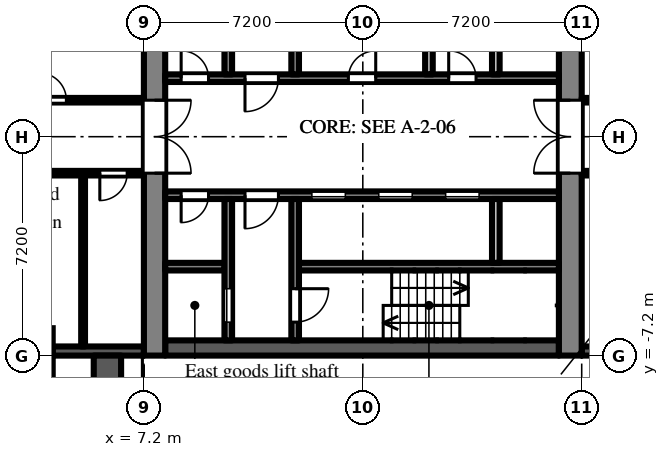
"""IFC4 building model, lengths in metres.
Left out: names, types, materials, properties, quantities, classifications, styles, units other than length and angle.
Written with IfcOpenShell. Run it as: python <this file> out.ifc"""

import sys

from ifc_helpers import new_model, si_unit, direction, frame, frame_2d, origin, place, context, subcontext, project, spatial, rectangle, extrude, element, fill, save


model = new_model("IFC4")
c1 = context("Model", 3, precision=1e-05, world=origin(), true_north=direction((0.0, 1.0)))
c2 = subcontext(c1, "Body", "Model", "MODEL_VIEW")
j1 = project(units=[si_unit("LENGTHUNIT", "METRE"), si_unit("PLANEANGLEUNIT", "RADIAN")], contexts=[c1])
p1 = place(None, origin())
s1 = spatial("IfcSite", under=j1, at=p1, CompositionType="ELEMENT")
p2 = place(p1, origin())
s2 = spatial("IfcBuilding", under=s1, at=p2, CompositionType="ELEMENT")
p3 = place(p2, frame((0.0, 0.0, 29.7)))
s3 = spatial("IfcBuildingStorey", under=s2, at=p3, CompositionType="ELEMENT", Elevation=29.7)
p4 = place(p3, frame((21.6, -7.05, 0.0), z_axis=(0.0, 0.0, 1.0), x_axis=(1.0, 0.0, 0.0)))
e1 = element("IfcWall", 1, at=p4, inside=s3, PredefinedType="SOLIDWALL", context=c2, shape_type="SweptSolid", body=[
    extrude(rectangle(XDim=2.7, YDim=0.3, at=frame_2d((1.35, 0.0))), origin(), (0.0, 0.0, 1.0), 2.1),
])
p5 = place(p4, frame((0.75, 0.0, 0.2)))
e2 = element("IfcOpeningElement", 2, at=p5, cuts=e1, PredefinedType="OPENING", context=c2, shape_type="SweptSolid", body=[
    extrude(rectangle(XDim=1.2, YDim=1.85, at=frame_2d((0.6, 0.925))), frame((0.0, 0.16, 0.0), z_axis=(0.0, -1.0, 0.0), x_axis=(1.0, 0.0, 0.0)), (0.0, 0.0, 1.0), 0.32),
])
p6 = place(p3, frame((4.05, -14.4, 0.0), z_axis=(0.0, 0.0, 1.0), x_axis=(0.0, 1.0, 0.0)))
e3 = element("IfcWall", 3, at=p6, inside=s3, PredefinedType="SOLIDWALL", context=c2, shape_type="SweptSolid", body=[
    extrude(rectangle(XDim=7.2, YDim=0.3, at=frame_2d((3.6, 0.0))), origin(), (0.0, 0.0, 1.0), 2.1),
])
p7 = place(p6, frame((3.0, 0.0, 0.0)))
e4 = element("IfcOpeningElement", 4, at=p7, cuts=e3, PredefinedType="OPENING", context=c2, shape_type="SweptSolid", body=[
    extrude(rectangle(XDim=1.2, YDim=2.05, at=frame_2d((0.6, 1.025))), frame((0.0, 0.16, 0.0), z_axis=(0.0, -1.0, 0.0), x_axis=(1.0, 0.0, 0.0)), (0.0, 0.0, 1.0), 0.32),
])
p8 = place(p6, frame((0.9, 0.0, 0.2)))
e5 = element("IfcOpeningElement", 5, at=p8, cuts=e3, PredefinedType="OPENING", context=c2, shape_type="SweptSolid", body=[
    extrude(rectangle(XDim=1.8, YDim=1.85, at=frame_2d((0.9, 0.925))), frame((0.0, 0.16, 0.0), z_axis=(0.0, -1.0, 0.0), x_axis=(1.0, 0.0, 0.0)), (0.0, 0.0, 1.0), 0.32),
])
p9 = place(p6, frame((4.5, 0.0, 0.2)))
e6 = element("IfcOpeningElement", 6, at=p9, cuts=e3, PredefinedType="OPENING", context=c2, shape_type="SweptSolid", body=[
    extrude(rectangle(XDim=1.8, YDim=1.85, at=frame_2d((0.9, 0.925))), frame((0.0, 0.16, 0.0), z_axis=(0.0, -1.0, 0.0), x_axis=(1.0, 0.0, 0.0)), (0.0, 0.0, 1.0), 0.32),
])
p10 = place(p3, frame((4.2, -7.05, 0.0), z_axis=(0.0, 0.0, 1.0), x_axis=(1.0, 0.0, 0.0)))
e7 = element("IfcWall", 7, at=p10, inside=s3, PredefinedType="SOLIDWALL", context=c2, shape_type="SweptSolid", body=[
    extrude(rectangle(XDim=3.0, YDim=0.3, at=frame_2d((1.5, 0.0))), origin(), (0.0, 0.0, 1.0), 2.1),
])
p11 = place(p3, frame((6.0, -14.4, 0.0), z_axis=(0.0, 0.0, 1.0), x_axis=(0.0, 1.0, 0.0)))
e8 = element("IfcWall", 8, at=p11, inside=s3, PredefinedType="PARAPET", context=c2, shape_type="SweptSolid", body=[
    extrude(rectangle(XDim=7.2, YDim=0.9, at=frame_2d((3.6, 0.0))), origin(), (0.0, 0.0, 1.0), 0.8),
])
p12 = place(p3, frame((7.55, -7.2, 0.0), z_axis=(0.0, 0.0, 1.0), x_axis=(0.0, 1.0, 0.0)))
e9 = element("IfcWall", 9, at=p12, inside=s3, PredefinedType="SHEAR", context=c2, shape_type="SweptSolid", body=[
    extrude(rectangle(XDim=14.4, YDim=0.7, at=frame_2d((7.2, 0.0))), origin(), (0.0, 0.0, 1.0), 2.575),
])
p13 = place(p12, frame((6.0, 0.0, 0.0)))
e10 = element("IfcOpeningElement", 10, at=p13, cuts=e9, PredefinedType="OPENING", context=c2, shape_type="SweptSolid", body=[
    extrude(rectangle(XDim=2.4, YDim=2.2, at=frame_2d((1.2, 1.1))), frame((0.0, 0.36, 0.0), z_axis=(0.0, -1.0, 0.0), x_axis=(1.0, 0.0, 0.0)), (0.0, 0.0, 1.0), 0.72),
])
p14 = place(p3, frame((21.225, -7.2, 0.0), z_axis=(0.0, 0.0, 1.0), x_axis=(0.0, 1.0, 0.0)))
e11 = element("IfcWall", 11, at=p14, inside=s3, PredefinedType="SHEAR", context=c2, shape_type="SweptSolid", body=[
    extrude(rectangle(XDim=14.4, YDim=0.75, at=frame_2d((7.2, 0.0))), origin(), (0.0, 0.0, 1.0), 2.575),
])
p15 = place(p14, frame((6.0, 0.0, 0.0)))
e12 = element("IfcOpeningElement", 12, at=p15, cuts=e11, PredefinedType="OPENING", context=c2, shape_type="SweptSolid", body=[
    extrude(rectangle(XDim=2.4, YDim=2.2, at=frame_2d((1.2, 1.1))), frame((0.0, 0.385, 0.0), z_axis=(0.0, -1.0, 0.0), x_axis=(1.0, 0.0, 0.0)), (0.0, 0.0, 1.0), 0.77),
])
p16 = place(p3, frame((7.9, 1.925, 0.0), z_axis=(0.0, 0.0, 1.0), x_axis=(1.0, 0.0, 0.0)))
e13 = element("IfcWall", 13, at=p16, inside=s3, PredefinedType="SHEAR", context=c2, shape_type="SweptSolid", body=[
    extrude(rectangle(XDim=12.95, YDim=0.25, at=frame_2d((6.475, 0.0))), origin(), (0.0, 0.0, 1.0), 2.575),
])
p17 = place(p16, frame((0.525, 0.0, 0.0)))
e14 = element("IfcOpeningElement", 14, at=p17, cuts=e13, PredefinedType="OPENING", context=c2, shape_type="SweptSolid", body=[
    extrude(rectangle(XDim=0.9, YDim=2.1, at=frame_2d((0.45, 1.05))), frame((0.0, 0.135, 0.0), z_axis=(0.0, -1.0, 0.0), x_axis=(1.0, 0.0, 0.0)), (0.0, 0.0, 1.0), 0.27),
])
p18 = place(p16, frame((2.625, 0.0, 0.0)))
e15 = element("IfcOpeningElement", 15, at=p18, cuts=e13, PredefinedType="OPENING", context=c2, shape_type="SweptSolid", body=[
    extrude(rectangle(XDim=1.1, YDim=2.1, at=frame_2d((0.55, 1.05))), frame((0.0, 0.135, 0.0), z_axis=(0.0, -1.0, 0.0), x_axis=(1.0, 0.0, 0.0)), (0.0, 0.0, 1.0), 0.27),
])
p19 = place(p16, frame((6.025, 0.0, 0.0)))
e16 = element("IfcOpeningElement", 16, at=p19, cuts=e13, PredefinedType="OPENING", context=c2, shape_type="SweptSolid", body=[
    extrude(rectangle(XDim=0.9, YDim=2.1, at=frame_2d((0.45, 1.05))), frame((0.0, 0.135, 0.0), z_axis=(0.0, -1.0, 0.0), x_axis=(1.0, 0.0, 0.0)), (0.0, 0.0, 1.0), 0.27),
])
p20 = place(p16, frame((9.325, 0.0, 0.0)))
e17 = element("IfcOpeningElement", 17, at=p20, cuts=e13, PredefinedType="OPENING", context=c2, shape_type="SweptSolid", body=[
    extrude(rectangle(XDim=0.9, YDim=2.1, at=frame_2d((0.45, 1.05))), frame((0.0, 0.135, 0.0), z_axis=(0.0, -1.0, 0.0), x_axis=(1.0, 0.0, 0.0)), (0.0, 0.0, 1.0), 0.27),
])
p21 = place(p3, frame((9.975, 2.05, 0.0), z_axis=(0.0, 0.0, 1.0), x_axis=(0.0, 1.0, 0.0)))
e18 = element("IfcWall", 18, at=p21, inside=s3, PredefinedType="SHEAR", context=c2, shape_type="SweptSolid", body=[
    extrude(rectangle(XDim=4.65, YDim=0.25, at=frame_2d((2.325, 0.0))), origin(), (0.0, 0.0, 1.0), 2.575),
])
p22 = place(p21, frame((2.95, 0.0, 0.0)))
e19 = element("IfcOpeningElement", 19, at=p22, cuts=e18, PredefinedType="OPENING", context=c2, shape_type="SweptSolid", body=[
    extrude(rectangle(XDim=1.1, YDim=2.1, at=frame_2d((0.55, 1.05))), frame((0.0, 0.135, 0.0), z_axis=(0.0, -1.0, 0.0), x_axis=(1.0, 0.0, 0.0)), (0.0, 0.0, 1.0), 0.27),
])
p23 = place(p3, frame((12.175, 2.05, 0.0), z_axis=(0.0, 0.0, 1.0), x_axis=(0.0, 1.0, 0.0)))
e20 = element("IfcWall", 20, at=p23, inside=s3, PredefinedType="SHEAR", context=c2, shape_type="SweptSolid", body=[
    extrude(rectangle(XDim=4.65, YDim=0.25, at=frame_2d((2.325, 0.0))), origin(), (0.0, 0.0, 1.0), 2.575),
])
p24 = place(p23, frame((2.95, 0.0, 0.0)))
e21 = element("IfcOpeningElement", 21, at=p24, cuts=e20, PredefinedType="OPENING", context=c2, shape_type="SweptSolid", body=[
    extrude(rectangle(XDim=1.1, YDim=2.1, at=frame_2d((0.55, 1.05))), frame((0.0, 0.135, 0.0), z_axis=(0.0, -1.0, 0.0), x_axis=(1.0, 0.0, 0.0)), (0.0, 0.0, 1.0), 0.27),
])
for number, where, z_axis, x_axis in (
    (22, (16.575, 2.05, 0.0), (0.0, 0.0, 1.0), (0.0, 1.0, 0.0)),
    (23, (18.775, 2.05, 0.0), (0.0, 0.0, 1.0), (0.0, 1.0, 0.0)),
):
    element("IfcWall", number, at=place(p3, frame(where, z_axis=z_axis, x_axis=x_axis)), inside=s3, PredefinedType="PARTITIONING", context=c2, shape_type="SweptSolid", body=[
        extrude(rectangle(XDim=2.1, YDim=0.25, at=frame_2d((1.05, 0.0))), origin(), (0.0, 0.0, 1.0), 2.575),
    ])
p25 = place(p3, frame((7.9, -6.95, 0.0), z_axis=(0.0, 0.0, 1.0), x_axis=(1.0, 0.0, 0.0)))
e24 = element("IfcWall", 24, at=p25, inside=s3, PredefinedType="SHEAR", context=c2, shape_type="SweptSolid", body=[
    extrude(rectangle(XDim=12.95, YDim=0.5, at=frame_2d((6.475, 0.0))), origin(), (0.0, 0.0, 1.0), 2.575),
])
p26 = place(p3, frame((7.9, -1.925, 0.0), z_axis=(0.0, 0.0, 1.0), x_axis=(1.0, 0.0, 0.0)))
e25 = element("IfcWall", 25, at=p26, inside=s3, PredefinedType="SHEAR", context=c2, shape_type="SweptSolid", body=[
    extrude(rectangle(XDim=12.95, YDim=0.25, at=frame_2d((6.475, 0.0))), origin(), (0.0, 0.0, 1.0), 2.575),
])
p27 = place(p26, frame((4.825, 0.0, 0.0)))
e26 = element("IfcOpeningElement", 26, at=p27, cuts=e25, PredefinedType="OPENING", context=c2, shape_type="SweptSolid", body=[
    extrude(rectangle(XDim=1.1, YDim=2.1, at=frame_2d((0.55, 1.05))), frame((0.0, 0.135, 0.0), z_axis=(0.0, -1.0, 0.0), x_axis=(1.0, 0.0, 0.0)), (0.0, 0.0, 1.0), 0.27),
])
p28 = place(p26, frame((7.025, 0.0, 0.0)))
e27 = element("IfcOpeningElement", 27, at=p28, cuts=e25, PredefinedType="OPENING", context=c2, shape_type="SweptSolid", body=[
    extrude(rectangle(XDim=1.1, YDim=2.1, at=frame_2d((0.55, 1.05))), frame((0.0, 0.135, 0.0), z_axis=(0.0, -1.0, 0.0), x_axis=(1.0, 0.0, 0.0)), (0.0, 0.0, 1.0), 0.27),
])
p29 = place(p26, frame((9.225, 0.0, 0.0)))
e28 = element("IfcOpeningElement", 28, at=p29, cuts=e25, PredefinedType="OPENING", context=c2, shape_type="SweptSolid", body=[
    extrude(rectangle(XDim=1.1, YDim=2.1, at=frame_2d((0.55, 1.05))), frame((0.0, 0.135, 0.0), z_axis=(0.0, -1.0, 0.0), x_axis=(1.0, 0.0, 0.0)), (0.0, 0.0, 1.0), 0.27),
])
p30 = place(p26, frame((0.525, 0.0, 0.0)))
e29 = element("IfcOpeningElement", 29, at=p30, cuts=e25, PredefinedType="OPENING", context=c2, shape_type="SweptSolid", body=[
    extrude(rectangle(XDim=0.9, YDim=2.1, at=frame_2d((0.45, 1.05))), frame((0.0, 0.135, 0.0), z_axis=(0.0, -1.0, 0.0), x_axis=(1.0, 0.0, 0.0)), (0.0, 0.0, 1.0), 0.27),
])
p31 = place(p26, frame((2.625, 0.0, 0.0)))
e30 = element("IfcOpeningElement", 30, at=p31, cuts=e25, PredefinedType="OPENING", context=c2, shape_type="SweptSolid", body=[
    extrude(rectangle(XDim=1.1, YDim=2.1, at=frame_2d((0.55, 1.05))), frame((0.0, 0.135, 0.0), z_axis=(0.0, -1.0, 0.0), x_axis=(1.0, 0.0, 0.0)), (0.0, 0.0, 1.0), 0.27),
])
p32 = place(p3, frame((7.9, -4.275, 0.0), z_axis=(0.0, 0.0, 1.0), x_axis=(1.0, 0.0, 0.0)))
e31 = element("IfcWall", 31, at=p32, inside=s3, PredefinedType="SHEAR", context=c2, shape_type="SweptSolid", body=[
    extrude(rectangle(XDim=1.95, YDim=0.25, at=frame_2d((0.975, 0.0))), origin(), (0.0, 0.0, 1.0), 2.575),
])
p33 = place(p3, frame((12.3, -4.275, 0.0), z_axis=(0.0, 0.0, 1.0), x_axis=(1.0, 0.0, 0.0)))
e32 = element("IfcWall", 32, at=p33, inside=s3, PredefinedType="SHEAR", context=c2, shape_type="SweptSolid", body=[
    extrude(rectangle(XDim=8.55, YDim=0.25, at=frame_2d((4.275, 0.0))), origin(), (0.0, 0.0, 1.0), 2.575),
])
p34 = place(p3, frame((9.975, -2.05, 0.0), z_axis=(0.0, 0.0, 1.0), x_axis=(0.0, -1.0, 0.0)))
e33 = element("IfcWall", 33, at=p34, inside=s3, PredefinedType="SHEAR", context=c2, shape_type="SweptSolid", body=[
    extrude(rectangle(XDim=4.65, YDim=0.25, at=frame_2d((2.325, 0.0))), origin(), (0.0, 0.0, 1.0), 2.575),
])
p35 = place(p34, frame((2.95, 0.0, 0.0)))
e34 = element("IfcOpeningElement", 34, at=p35, cuts=e33, PredefinedType="OPENING", context=c2, shape_type="SweptSolid", body=[
    extrude(rectangle(XDim=1.1, YDim=2.1, at=frame_2d((0.55, 1.05))), frame((0.0, 0.135, 0.0), z_axis=(0.0, -1.0, 0.0), x_axis=(1.0, 0.0, 0.0)), (0.0, 0.0, 1.0), 0.27),
])
p36 = place(p3, frame((12.175, -2.05, 0.0), z_axis=(0.0, 0.0, 1.0), x_axis=(0.0, -1.0, 0.0)))
e35 = element("IfcWall", 35, at=p36, inside=s3, PredefinedType="SHEAR", context=c2, shape_type="SweptSolid", body=[
    extrude(rectangle(XDim=4.65, YDim=0.25, at=frame_2d((2.325, 0.0))), origin(), (0.0, 0.0, 1.0), 2.575),
])
p37 = place(p36, frame((2.95, 0.0, 0.0)))
e36 = element("IfcOpeningElement", 36, at=p37, cuts=e35, PredefinedType="OPENING", context=c2, shape_type="SweptSolid", body=[
    extrude(rectangle(XDim=1.1, YDim=2.1, at=frame_2d((0.55, 1.05))), frame((0.0, 0.135, 0.0), z_axis=(0.0, -1.0, 0.0), x_axis=(1.0, 0.0, 0.0)), (0.0, 0.0, 1.0), 0.27),
])
p38 = place(p3, frame((18.775, -2.05, 0.0), z_axis=(0.0, 0.0, 1.0), x_axis=(0.0, -1.0, 0.0)))
e37 = element("IfcWall", 37, at=p38, inside=s3, PredefinedType="PARTITIONING", context=c2, shape_type="SweptSolid", body=[
    extrude(rectangle(XDim=2.1, YDim=0.25, at=frame_2d((1.05, 0.0))), origin(), (0.0, 0.0, 1.0), 2.575),
])
p39 = place(p3, frame((1.275, -1.2, 0.0), z_axis=(0.0, 0.0, 1.0), x_axis=(1.0, 0.0, 0.0)))
e38 = element("IfcWall", 38, at=p39, inside=s3, PredefinedType="PARTITIONING", context=c2, shape_type="SweptSolid", body=[
    extrude(rectangle(XDim=5.925, YDim=0.15, at=frame_2d((2.962, 0.0))), origin(), (0.0, 0.0, 1.0), 2.575),
])
p40 = place(p39, frame((4.475, 0.0, 0.0)))
e39 = element("IfcOpeningElement", 39, at=p40, cuts=e38, PredefinedType="OPENING", context=c2, shape_type="SweptSolid", body=[
    extrude(rectangle(XDim=0.9, YDim=2.1, at=frame_2d((0.45, 1.05))), frame((0.0, 0.085, 0.0), z_axis=(0.0, -1.0, 0.0), x_axis=(1.0, 0.0, 0.0)), (0.0, 0.0, 1.0), 0.17),
])
p41 = place(p3, frame((1.275, 1.2, 0.0), z_axis=(0.0, 0.0, 1.0), x_axis=(1.0, 0.0, 0.0)))
e40 = element("IfcWall", 40, at=p41, inside=s3, PredefinedType="PARTITIONING", context=c2, shape_type="SweptSolid", body=[
    extrude(rectangle(XDim=5.925, YDim=0.15, at=frame_2d((2.962, 0.0))), origin(), (0.0, 0.0, 1.0), 2.575),
])
p42 = place(p41, frame((2.475, 0.0, 0.0)))
e41 = element("IfcOpeningElement", 41, at=p42, cuts=e40, PredefinedType="OPENING", context=c2, shape_type="SweptSolid", body=[
    extrude(rectangle(XDim=0.9, YDim=2.1, at=frame_2d((0.45, 1.05))), frame((0.0, 0.085, 0.0), z_axis=(0.0, -1.0, 0.0), x_axis=(1.0, 0.0, 0.0)), (0.0, 0.0, 1.0), 0.17),
])
p43 = place(p3, frame((5.2, -6.9, 0.0), z_axis=(0.0, 0.0, 1.0), x_axis=(0.0, 1.0, 0.0)))
e42 = element("IfcWall", 42, at=p43, inside=s3, PredefinedType="PARTITIONING", context=c2, shape_type="SweptSolid", body=[
    extrude(rectangle(XDim=5.625, YDim=0.125, at=frame_2d((2.812, 0.0))), origin(), (0.0, 0.0, 1.0), 2.575),
])
p44 = place(p3, frame((21.6, -1.2, 0.0), z_axis=(0.0, 0.0, 1.0), x_axis=(1.0, 0.0, 0.0)))
e43 = element("IfcWall", 43, at=p44, inside=s3, PredefinedType="PARTITIONING", context=c2, shape_type="SweptSolid", body=[
    extrude(rectangle(XDim=14.9, YDim=0.15, at=frame_2d((7.45, 0.0))), origin(), (0.0, 0.0, 1.0), 2.575),
])
p45 = place(p44, frame((1.35, 0.0, 0.0)))
e44 = element("IfcOpeningElement", 44, at=p45, cuts=e43, PredefinedType="OPENING", context=c2, shape_type="SweptSolid", body=[
    extrude(rectangle(XDim=0.9, YDim=2.1, at=frame_2d((0.45, 1.05))), frame((0.0, 0.085, 0.0), z_axis=(0.0, -1.0, 0.0), x_axis=(1.0, 0.0, 0.0)), (0.0, 0.0, 1.0), 0.17),
])
p46 = place(p44, frame((5.71, 0.0, 0.0)))
e45 = element("IfcOpeningElement", 45, at=p46, cuts=e43, PredefinedType="OPENING", context=c2, shape_type="SweptSolid", body=[
    extrude(rectangle(XDim=1.0, YDim=2.1, at=frame_2d((0.5, 1.05))), frame((0.0, 0.085, 0.0), z_axis=(0.0, -1.0, 0.0), x_axis=(1.0, 0.0, 0.0)), (0.0, 0.0, 1.0), 0.17),
])
p47 = place(p44, frame((11.95, 0.0, 0.0)))
e46 = element("IfcOpeningElement", 46, at=p47, cuts=e43, PredefinedType="OPENING", context=c2, shape_type="SweptSolid", body=[
    extrude(rectangle(XDim=1.8, YDim=2.1, at=frame_2d((0.9, 1.05))), frame((0.0, 0.085, 0.0), z_axis=(0.0, -1.0, 0.0), x_axis=(1.0, 0.0, 0.0)), (0.0, 0.0, 1.0), 0.17),
])
p48 = place(p3, frame((21.6, 1.2, 0.0), z_axis=(0.0, 0.0, 1.0), x_axis=(1.0, 0.0, 0.0)))
e47 = element("IfcWall", 47, at=p48, inside=s3, PredefinedType="PARTITIONING", context=c2, shape_type="SweptSolid", body=[
    extrude(rectangle(XDim=14.9, YDim=0.15, at=frame_2d((7.45, 0.0))), origin(), (0.0, 0.0, 1.0), 2.575),
])
p49 = place(p48, frame((6.0, 0.0, 0.0)))
e48 = element("IfcOpeningElement", 48, at=p49, cuts=e47, PredefinedType="OPENING", context=c2, shape_type="SweptSolid", body=[
    extrude(rectangle(XDim=1.0, YDim=2.1, at=frame_2d((0.5, 1.05))), frame((0.0, 0.085, 0.0), z_axis=(0.0, -1.0, 0.0), x_axis=(1.0, 0.0, 0.0)), (0.0, 0.0, 1.0), 0.17),
])
p50 = place(p48, frame((9.6, 0.0, 0.0)))
e49 = element("IfcOpeningElement", 49, at=p50, cuts=e47, PredefinedType="OPENING", context=c2, shape_type="SweptSolid", body=[
    extrude(rectangle(XDim=1.0, YDim=2.1, at=frame_2d((0.5, 1.05))), frame((0.0, 0.085, 0.0), z_axis=(0.0, -1.0, 0.0), x_axis=(1.0, 0.0, 0.0)), (0.0, 0.0, 1.0), 0.17),
])
p51 = place(p48, frame((11.95, 0.0, 0.0)))
e50 = element("IfcOpeningElement", 50, at=p51, cuts=e47, PredefinedType="OPENING", context=c2, shape_type="SweptSolid", body=[
    extrude(rectangle(XDim=1.8, YDim=2.1, at=frame_2d((0.9, 1.05))), frame((0.0, 0.085, 0.0), z_axis=(0.0, -1.0, 0.0), x_axis=(1.0, 0.0, 0.0)), (0.0, 0.0, 1.0), 0.17),
])
p52 = place(p27, origin())
e51 = element("IfcDoor", 51, at=p52, inside=s3, OperationType="SLIDING_TO_LEFT", PredefinedType="DOOR", context=c2, shape_type="SweptSolid", body=[
    extrude(rectangle(XDim=1.1, YDim=2.1, at=frame_2d((0.55, 1.05))), frame((0.0, 0.025, 0.0), z_axis=(0.0, -1.0, 0.0), x_axis=(1.0, 0.0, 0.0)), (0.0, 0.0, 1.0), 0.05),
])
fill(e26, e51)
p53 = place(p28, origin())
e52 = element("IfcDoor", 52, at=p53, inside=s3, OperationType="SLIDING_TO_LEFT", PredefinedType="DOOR", context=c2, shape_type="SweptSolid", body=[
    extrude(rectangle(XDim=1.1, YDim=2.1, at=frame_2d((0.55, 1.05))), frame((0.0, 0.025, 0.0), z_axis=(0.0, -1.0, 0.0), x_axis=(1.0, 0.0, 0.0)), (0.0, 0.0, 1.0), 0.05),
])
fill(e27, e52)
p54 = place(p29, origin())
e53 = element("IfcDoor", 53, at=p54, inside=s3, OperationType="SLIDING_TO_LEFT", PredefinedType="DOOR", context=c2, shape_type="SweptSolid", body=[
    extrude(rectangle(XDim=1.1, YDim=2.1, at=frame_2d((0.55, 1.05))), frame((0.0, 0.025, 0.0), z_axis=(0.0, -1.0, 0.0), x_axis=(1.0, 0.0, 0.0)), (0.0, 0.0, 1.0), 0.05),
])
fill(e28, e53)
p55 = place(p35, origin())
e54 = element("IfcDoor", 54, at=p55, inside=s3, OperationType="SLIDING_TO_LEFT", PredefinedType="DOOR", context=c2, shape_type="SweptSolid", body=[
    extrude(rectangle(XDim=1.1, YDim=2.1, at=frame_2d((0.55, 1.05))), frame((0.0, 0.025, 0.0), z_axis=(0.0, -1.0, 0.0), x_axis=(1.0, 0.0, 0.0)), (0.0, 0.0, 1.0), 0.05),
])
fill(e34, e54)
p56 = place(p37, origin())
e55 = element("IfcDoor", 55, at=p56, inside=s3, OperationType="SINGLE_SWING_LEFT", PredefinedType="DOOR", context=c2, shape_type="SweptSolid", body=[
    extrude(rectangle(XDim=1.1, YDim=2.1, at=frame_2d((0.55, 1.05))), frame((0.0, 0.025, 0.0), z_axis=(0.0, -1.0, 0.0), x_axis=(1.0, 0.0, 0.0)), (0.0, 0.0, 1.0), 0.05),
])
fill(e36, e55)
p57 = place(p17, origin())
e56 = element("IfcDoor", 56, at=p57, inside=s3, OperationType="SINGLE_SWING_LEFT", PredefinedType="DOOR", context=c2, shape_type="SweptSolid", body=[
    extrude(rectangle(XDim=0.9, YDim=2.1, at=frame_2d((0.45, 1.05))), frame((0.0, 0.025, 0.0), z_axis=(0.0, -1.0, 0.0), x_axis=(1.0, 0.0, 0.0)), (0.0, 0.0, 1.0), 0.05),
])
fill(e14, e56)
p58 = place(p30, frame((0.9, 0.0, 0.0), z_axis=(0.0, 0.0, 1.0), x_axis=(-1.0, 0.0, 0.0)))
e57 = element("IfcDoor", 57, at=p58, inside=s3, OperationType="SINGLE_SWING_RIGHT", PredefinedType="DOOR", context=c2, shape_type="SweptSolid", body=[
    extrude(rectangle(XDim=0.9, YDim=2.1, at=frame_2d((0.45, 1.05))), frame((0.0, 0.025, 0.0), z_axis=(0.0, -1.0, 0.0), x_axis=(1.0, 0.0, 0.0)), (0.0, 0.0, 1.0), 0.05),
])
fill(e29, e57)
p59 = place(p18, frame((1.1, 0.0, 0.0), z_axis=(0.0, 0.0, 1.0), x_axis=(-1.0, 0.0, 0.0)))
e58 = element("IfcDoor", 58, at=p59, inside=s3, OperationType="SINGLE_SWING_RIGHT", PredefinedType="DOOR", context=c2, shape_type="SweptSolid", body=[
    extrude(rectangle(XDim=1.1, YDim=2.1, at=frame_2d((0.55, 1.05))), frame((0.0, 0.025, 0.0), z_axis=(0.0, -1.0, 0.0), x_axis=(1.0, 0.0, 0.0)), (0.0, 0.0, 1.0), 0.05),
])
fill(e15, e58)
p60 = place(p31, frame((1.1, 0.0, 0.0), z_axis=(0.0, 0.0, 1.0), x_axis=(-1.0, 0.0, 0.0)))
e59 = element("IfcDoor", 59, at=p60, inside=s3, OperationType="SINGLE_SWING_RIGHT", PredefinedType="DOOR", context=c2, shape_type="SweptSolid", body=[
    extrude(rectangle(XDim=1.1, YDim=2.1, at=frame_2d((0.55, 1.05))), frame((0.0, 0.025, 0.0), z_axis=(0.0, -1.0, 0.0), x_axis=(1.0, 0.0, 0.0)), (0.0, 0.0, 1.0), 0.05),
])
fill(e30, e59)
p61 = place(p13, frame((2.4, 0.0, 0.0), z_axis=(0.0, 0.0, 1.0), x_axis=(-1.0, 0.0, 0.0)))
e60 = element("IfcDoor", 60, at=p61, inside=s3, OperationType="DOUBLE_DOOR_DOUBLE_SWING", PredefinedType="DOOR", context=c2, shape_type="SweptSolid", body=[
    extrude(rectangle(XDim=2.4, YDim=2.2, at=frame_2d((1.2, 1.1))), frame((0.0, 0.025, 0.0), z_axis=(0.0, -1.0, 0.0), x_axis=(1.0, 0.0, 0.0)), (0.0, 0.0, 1.0), 0.05),
])
fill(e10, e60)
p62 = place(p15, origin())
e61 = element("IfcDoor", 61, at=p62, inside=s3, OperationType="DOUBLE_DOOR_DOUBLE_SWING", PredefinedType="DOOR", context=c2, shape_type="SweptSolid", body=[
    extrude(rectangle(XDim=2.4, YDim=2.2, at=frame_2d((1.2, 1.1))), frame((0.0, 0.025, 0.0), z_axis=(0.0, -1.0, 0.0), x_axis=(1.0, 0.0, 0.0)), (0.0, 0.0, 1.0), 0.05),
])
fill(e12, e61)
p63 = place(p19, origin())
e62 = element("IfcDoor", 62, at=p63, inside=s3, OperationType="SINGLE_SWING_RIGHT", PredefinedType="DOOR", context=c2, shape_type="SweptSolid", body=[
    extrude(rectangle(XDim=0.9, YDim=2.1, at=frame_2d((0.45, 1.05))), frame((0.0, 0.025, 0.0), z_axis=(0.0, -1.0, 0.0), x_axis=(1.0, 0.0, 0.0)), (0.0, 0.0, 1.0), 0.05),
])
fill(e16, e62)
p64 = place(p20, origin())
e63 = element("IfcDoor", 63, at=p64, inside=s3, OperationType="SINGLE_SWING_LEFT", PredefinedType="DOOR", context=c2, shape_type="SweptSolid", body=[
    extrude(rectangle(XDim=0.9, YDim=2.1, at=frame_2d((0.45, 1.05))), frame((0.0, 0.025, 0.0), z_axis=(0.0, -1.0, 0.0), x_axis=(1.0, 0.0, 0.0)), (0.0, 0.0, 1.0), 0.05),
])
fill(e17, e63)
p65 = place(p42, origin())
e64 = element("IfcDoor", 64, at=p65, inside=s3, OperationType="SINGLE_SWING_LEFT", PredefinedType="DOOR", context=c2, shape_type="SweptSolid", body=[
    extrude(rectangle(XDim=0.9, YDim=2.1, at=frame_2d((0.45, 1.05))), frame((0.0, 0.025, 0.0), z_axis=(0.0, -1.0, 0.0), x_axis=(1.0, 0.0, 0.0)), (0.0, 0.0, 1.0), 0.05),
])
fill(e41, e64)
p66 = place(p40, frame((0.9, 0.0, 0.0), z_axis=(0.0, 0.0, 1.0), x_axis=(-1.0, 0.0, 0.0)))
e65 = element("IfcDoor", 65, at=p66, inside=s3, OperationType="SINGLE_SWING_RIGHT", PredefinedType="DOOR", context=c2, shape_type="SweptSolid", body=[
    extrude(rectangle(XDim=0.9, YDim=2.1, at=frame_2d((0.45, 1.05))), frame((0.0, 0.025, 0.0), z_axis=(0.0, -1.0, 0.0), x_axis=(1.0, 0.0, 0.0)), (0.0, 0.0, 1.0), 0.05),
])
fill(e39, e65)
save(model, sys.argv[1])
